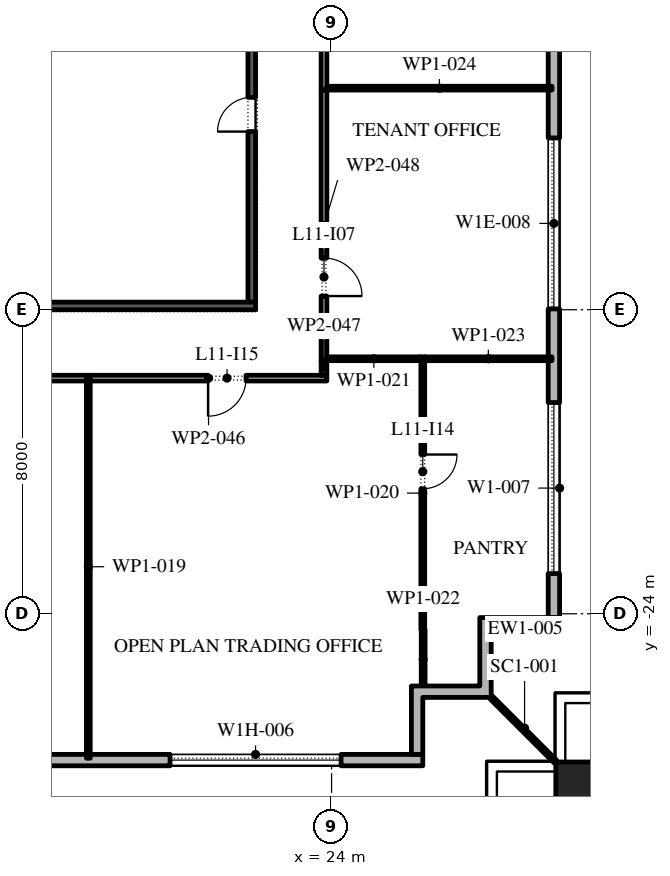
"""IFC4 building model, lengths in metres.
Left out: names, types, materials, properties, quantities, classifications, styles, units other than length and angle.
Written with IfcOpenShell. Run it as: python <this file> out.ifc"""

import sys

from ifc_helpers import new_model, si_unit, direction, frame, frame_2d, origin, origin_2d, place, context, subcontext, project, spatial, polyline, rectangle, outline, extrude, element, fill, save


model = new_model("IFC4")
c1 = context("Model", 3, precision=1e-05, world=origin(), true_north=direction((0.0, 1.0)))
c2 = subcontext(c1, "Body", "Model", "MODEL_VIEW")
j1 = project(units=[si_unit("LENGTHUNIT", "METRE"), si_unit("PLANEANGLEUNIT", "RADIAN")], contexts=[c1])
p1 = place(None, origin())
s1 = spatial("IfcSite", under=j1, at=p1, CompositionType="ELEMENT")
p2 = place(p1, origin())
s2 = spatial("IfcBuilding", under=s1, at=p2, CompositionType="ELEMENT")
p3 = place(p2, frame((0.0, 0.0, 56.4)))
s3 = spatial("IfcBuildingStorey", under=s2, at=p3, CompositionType="ELEMENT", Elevation=56.4)
p4 = place(p3, frame((30.6, -28.6, 0.0), z_axis=(0.0, 0.0, 1.0), x_axis=(1.0, 0.0, 0.0)))
e1 = element("IfcColumn", 1, at=p4, inside=s3, PredefinedType="COLUMN", context=c2, shape_type="SweptSolid", body=[
    extrude(rectangle(XDim=1.4, YDim=1.4, at=origin_2d()), origin(), (0.0, 0.0, 1.0), 4.2),
])
p5 = place(p3, frame((-26.1, -27.85, 0.0), z_axis=(0.0, 0.0, 1.0), x_axis=(1.0, 0.0, 0.0)))
e2 = element("IfcWall", 2, at=p5, inside=s3, PredefinedType="STANDARD", context=c2, shape_type="SweptSolid", body=[
    extrude(rectangle(XDim=52.5, YDim=0.3, at=frame_2d((26.25, 0.0))), origin(), (0.0, 0.0, 1.0), 4.0),
])
p6 = place(p5, frame((2.0, 0.0, 0.45)))
e3 = element("IfcOpeningElement", 3, at=p6, cuts=e2, PredefinedType="OPENING", context=c2, shape_type="SweptSolid", body=[
    extrude(rectangle(XDim=4.5, YDim=2.75, at=frame_2d((2.25, 1.375))), frame((0.0, 0.16, 0.0), z_axis=(0.0, -1.0, 0.0), x_axis=(1.0, 0.0, 0.0)), (0.0, 0.0, 1.0), 0.32),
])
p7 = place(p5, frame((10.65, 0.0, 0.45)))
e4 = element("IfcOpeningElement", 4, at=p7, cuts=e2, PredefinedType="OPENING", context=c2, shape_type="SweptSolid", body=[
    extrude(rectangle(XDim=4.5, YDim=2.75, at=frame_2d((2.25, 1.375))), frame((0.0, 0.16, 0.0), z_axis=(0.0, -1.0, 0.0), x_axis=(1.0, 0.0, 0.0)), (0.0, 0.0, 1.0), 0.32),
])
p8 = place(p5, frame((20.5, 0.0, 0.0)))
e5 = element("IfcOpeningElement", 5, at=p8, cuts=e2, PredefinedType="OPENING", context=c2, shape_type="SweptSolid", body=[
    extrude(rectangle(XDim=2.4, YDim=3.5, at=frame_2d((1.2, 1.75))), frame((0.0, 0.16, 0.0), z_axis=(0.0, -1.0, 0.0), x_axis=(1.0, 0.0, 0.0)), (0.0, 0.0, 1.0), 0.32),
])
p9 = place(p5, frame((28.25, 0.0, 0.45)))
e6 = element("IfcOpeningElement", 6, at=p9, cuts=e2, PredefinedType="OPENING", context=c2, shape_type="SweptSolid", body=[
    extrude(rectangle(XDim=4.5, YDim=2.75, at=frame_2d((2.25, 1.375))), frame((0.0, 0.16, 0.0), z_axis=(0.0, -1.0, 0.0), x_axis=(1.0, 0.0, 0.0)), (0.0, 0.0, 1.0), 0.32),
])
p10 = place(p5, frame((37.05, 0.0, 0.45)))
e7 = element("IfcOpeningElement", 7, at=p10, cuts=e2, PredefinedType="OPENING", context=c2, shape_type="SweptSolid", body=[
    extrude(rectangle(XDim=4.5, YDim=2.75, at=frame_2d((2.25, 1.375))), frame((0.0, 0.16, 0.0), z_axis=(0.0, -1.0, 0.0), x_axis=(1.0, 0.0, 0.0)), (0.0, 0.0, 1.0), 0.32),
])
p11 = place(p5, frame((45.85, 0.0, 0.45)))
e8 = element("IfcOpeningElement", 8, at=p11, cuts=e2, PredefinedType="OPENING", context=c2, shape_type="SweptSolid", body=[
    extrude(rectangle(XDim=4.5, YDim=2.75, at=frame_2d((2.25, 1.375))), frame((0.0, 0.16, 0.0), z_axis=(0.0, -1.0, 0.0), x_axis=(1.0, 0.0, 0.0)), (0.0, 0.0, 1.0), 0.32),
])
p12 = place(p3, frame((29.85, -24.1, 0.0), z_axis=(0.0, 0.0, 1.0), x_axis=(0.0, 1.0, 0.0)))
e9 = element("IfcWall", 9, at=p12, inside=s3, PredefinedType="STANDARD", context=c2, shape_type="SweptSolid", body=[
    extrude(rectangle(XDim=49.5, YDim=0.3, at=frame_2d((24.75, 0.0))), origin(), (0.0, 0.0, 1.0), 4.0),
])
p13 = place(p12, frame((1.157, 0.0, 0.45)))
e10 = element("IfcOpeningElement", 10, at=p13, cuts=e9, PredefinedType="OPENING", context=c2, shape_type="SweptSolid", body=[
    extrude(rectangle(XDim=4.5, YDim=3.05, at=frame_2d((2.25, 1.525))), frame((0.0, 0.16, 0.0), z_axis=(0.0, -1.0, 0.0), x_axis=(1.0, 0.0, 0.0)), (0.0, 0.0, 1.0), 0.32),
])
p14 = place(p12, frame((8.121, 0.0, 0.45)))
e11 = element("IfcOpeningElement", 11, at=p14, cuts=e9, PredefinedType="OPENING", context=c2, shape_type="SweptSolid", body=[
    extrude(rectangle(XDim=4.5, YDim=2.825, at=frame_2d((2.25, 1.413))), frame((0.0, 0.16, 0.0), z_axis=(0.0, -1.0, 0.0), x_axis=(1.0, 0.0, 0.0)), (0.0, 0.0, 1.0), 0.32),
])
p15 = place(p12, frame((16.286, 0.0, 0.0)))
e12 = element("IfcOpeningElement", 12, at=p15, cuts=e9, PredefinedType="OPENING", context=c2, shape_type="SweptSolid", body=[
    extrude(rectangle(XDim=2.4, YDim=3.325, at=frame_2d((1.2, 1.663))), frame((0.0, 0.16, 0.0), z_axis=(0.0, -1.0, 0.0), x_axis=(1.0, 0.0, 0.0)), (0.0, 0.0, 1.0), 0.32),
])
p16 = place(p12, frame((22.35, 0.0, 0.45)))
e13 = element("IfcOpeningElement", 13, at=p16, cuts=e9, PredefinedType="OPENING", context=c2, shape_type="SweptSolid", body=[
    extrude(rectangle(XDim=4.5, YDim=2.875, at=frame_2d((2.25, 1.438))), frame((0.0, 0.16, 0.0), z_axis=(0.0, -1.0, 0.0), x_axis=(1.0, 0.0, 0.0)), (0.0, 0.0, 1.0), 0.32),
])
p17 = place(p12, frame((29.464, 0.0, 0.45)))
e14 = element("IfcOpeningElement", 14, at=p17, cuts=e9, PredefinedType="OPENING", context=c2, shape_type="SweptSolid", body=[
    extrude(rectangle(XDim=4.5, YDim=2.875, at=frame_2d((2.25, 1.438))), frame((0.0, 0.16, 0.0), z_axis=(0.0, -1.0, 0.0), x_axis=(1.0, 0.0, 0.0)), (0.0, 0.0, 1.0), 0.32),
])
p18 = place(p12, frame((36.579, 0.0, 0.45)))
e15 = element("IfcOpeningElement", 15, at=p18, cuts=e9, PredefinedType="OPENING", context=c2, shape_type="SweptSolid", body=[
    extrude(rectangle(XDim=4.5, YDim=3.05, at=frame_2d((2.25, 1.525))), frame((0.0, 0.16, 0.0), z_axis=(0.0, -1.0, 0.0), x_axis=(1.0, 0.0, 0.0)), (0.0, 0.0, 1.0), 0.32),
])
p19 = place(p12, frame((44.743, 0.0, 0.0)))
e16 = element("IfcOpeningElement", 16, at=p19, cuts=e9, PredefinedType="OPENING", context=c2, shape_type="SweptSolid", body=[
    extrude(rectangle(XDim=2.4, YDim=3.325, at=frame_2d((1.2, 1.663))), frame((0.0, 0.16, 0.0), z_axis=(0.0, -1.0, 0.0), x_axis=(1.0, 0.0, 0.0)), (0.0, 0.0, 1.0), 0.32),
])
p20 = place(p3, origin())
e17 = element("IfcWall", 17, at=p20, inside=s3, PredefinedType="STANDARD", context=c2, shape_type="SweptSolid", body=[
    extrude(outline(polyline([(27.9, -25.9), (27.9, -24.1), (30.0, -24.1), (30.0, -24.4), (28.2, -24.4), (28.2, -26.2), (26.4, -26.2), (26.4, -27.7), (26.1, -27.7), (26.1, -25.9), (27.9, -25.9)])), origin(), (0.0, 0.0, 1.0), 4.0),
])
p21 = place(p3, frame((28.2, -26.2, -0.05), z_axis=(0.0, 0.0, 1.0), x_axis=(0.707106781187, -0.707106781187, 0.0)))
e18 = element("IfcWall", 18, at=p21, inside=s3, PredefinedType="STANDARD", context=c2, shape_type="SweptSolid", body=[
    extrude(rectangle(XDim=2.385, YDim=0.1, at=frame_2d((1.192, 0.0))), origin(), (0.0, 0.0, 1.0), 4.05),
])
p22 = place(p3, frame((21.9, -15.8, 0.0), z_axis=(0.0, 0.0, 1.0), x_axis=(0.0, 1.0, 0.0)))
e19 = element("IfcWall", 19, at=p22, inside=s3, PredefinedType="SHEAR", context=c2, shape_type="SweptSolid", body=[
    extrude(rectangle(XDim=13.05, YDim=0.2, at=frame_2d((6.525, 0.0))), origin(), (0.0, 0.0, 1.0), 4.0),
])
p23 = place(p22, frame((4.488, 0.0, 0.0)))
e20 = element("IfcOpeningElement", 20, at=p23, cuts=e19, PredefinedType="OPENING", context=c2, shape_type="SweptSolid", body=[
    extrude(rectangle(XDim=0.9, YDim=2.1, at=frame_2d((0.45, 1.05))), frame((0.0, 0.11, 0.0), z_axis=(0.0, -1.0, 0.0), x_axis=(1.0, 0.0, 0.0)), (0.0, 0.0, 1.0), 0.22),
])
p24 = place(p22, frame((11.038, 0.0, 0.0)))
e21 = element("IfcOpeningElement", 21, at=p24, cuts=e19, PredefinedType="OPENING", context=c2, shape_type="SweptSolid", body=[
    extrude(rectangle(XDim=1.0, YDim=2.1, at=frame_2d((0.5, 1.05))), frame((0.0, 0.11, 0.0), z_axis=(0.0, -1.0, 0.0), x_axis=(1.0, 0.0, 0.0)), (0.0, 0.0, 1.0), 0.22),
])
p25 = place(p3, frame((10.0, -15.9, 0.0), z_axis=(0.0, 0.0, 1.0), x_axis=(1.0, 0.0, 0.0)))
e22 = element("IfcWall", 22, at=p25, inside=s3, PredefinedType="SHEAR", context=c2, shape_type="SweptSolid", body=[
    extrude(rectangle(XDim=12.0, YDim=0.2, at=frame_2d((6.0, 0.0))), origin(), (0.0, 0.0, 1.0), 4.0),
])
p26 = place(p3, frame((17.6, -27.8, 0.0), z_axis=(0.0, 0.0, 1.0), x_axis=(0.0, 1.0, 0.0)))
e23 = element("IfcWall", 23, at=p26, inside=s3, PredefinedType="PARTITIONING", context=c2, shape_type="SweptSolid", body=[
    extrude(rectangle(XDim=10.075, YDim=0.1, at=frame_2d((5.038, 0.0))), origin(), (0.0, 0.0, 1.0), 4.0),
])
p27 = place(p3, frame((17.55, -17.8, 0.0), z_axis=(0.0, 0.0, 1.0), x_axis=(-1.0, 0.0, 0.0)))
e24 = element("IfcWall", 24, at=p27, inside=s3, PredefinedType="PARTITIONING", context=c2, shape_type="SweptSolid", body=[
    extrude(rectangle(XDim=8.7, YDim=0.15, at=frame_2d((4.35, 0.0))), origin(), (0.0, 0.0, 1.0), 4.0),
])
p28 = place(p27, frame((4.85, 0.0, 0.0)))
e25 = element("IfcOpeningElement", 25, at=p28, cuts=e24, PredefinedType="OPENING", context=c2, shape_type="SweptSolid", body=[
    extrude(rectangle(XDim=1.0, YDim=2.1, at=frame_2d((0.5, 1.05))), frame((0.0, 0.085, 0.0), z_axis=(0.0, -1.0, 0.0), x_axis=(1.0, 0.0, 0.0)), (0.0, 0.0, 1.0), 0.17),
])
p29 = place(p3, frame((23.875, -17.8, 0.0), z_axis=(0.0, 0.0, 1.0), x_axis=(-1.0, 0.0, 0.0)))
e26 = element("IfcWall", 26, at=p29, inside=s3, PredefinedType="PARTITIONING", context=c2, shape_type="SweptSolid", body=[
    extrude(rectangle(XDim=6.225, YDim=0.15, at=frame_2d((3.113, 0.0))), origin(), (0.0, 0.0, 1.0), 4.0),
])
p30 = place(p29, frame((2.125, 0.0, 0.0)))
e27 = element("IfcOpeningElement", 27, at=p30, cuts=e26, PredefinedType="OPENING", context=c2, shape_type="SweptSolid", body=[
    extrude(rectangle(XDim=1.0, YDim=2.1, at=frame_2d((0.5, 1.05))), frame((0.0, 0.085, 0.0), z_axis=(0.0, -1.0, 0.0), x_axis=(1.0, 0.0, 0.0)), (0.0, 0.0, 1.0), 0.17),
])
p31 = place(p3, frame((23.8, -17.34, 0.0), z_axis=(0.0, 0.0, 1.0), x_axis=(0.0, -1.0, 0.0)))
e28 = element("IfcWall", 28, at=p31, inside=s3, PredefinedType="PARTITIONING", context=c2, shape_type="SweptSolid", body=[
    extrude(rectangle(XDim=0.385, YDim=0.15, at=frame_2d((0.192, 0.0))), origin(), (0.0, 0.0, 1.0), 4.0),
])
p32 = place(p3, frame((23.8, -10.22, 0.0), z_axis=(0.0, 0.0, 1.0), x_axis=(0.0, -1.0, 0.0)))
e29 = element("IfcWall", 29, at=p32, inside=s3, PredefinedType="PARTITIONING", context=c2, shape_type="SweptSolid", body=[
    extrude(rectangle(XDim=7.12, YDim=0.15, at=frame_2d((3.56, 0.0))), origin(), (0.0, 0.0, 1.0), 4.0),
])
p33 = place(p32, frame((4.42, 0.0, 0.0)))
e30 = element("IfcOpeningElement", 30, at=p33, cuts=e29, PredefinedType="OPENING", context=c2, shape_type="SweptSolid", body=[
    extrude(rectangle(XDim=1.0, YDim=2.1, at=frame_2d((0.5, 1.05))), frame((0.0, 0.085, 0.0), z_axis=(0.0, -1.0, 0.0), x_axis=(1.0, 0.0, 0.0)), (0.0, 0.0, 1.0), 0.17),
])
p34 = place(p3, frame((23.8, 4.11, 0.0), z_axis=(0.0, 0.0, 1.0), x_axis=(0.0, -1.0, 0.0)))
e31 = element("IfcWall", 31, at=p34, inside=s3, PredefinedType="PARTITIONING", context=c2, shape_type="SweptSolid", body=[
    extrude(rectangle(XDim=14.33, YDim=0.15, at=frame_2d((7.165, 0.0))), origin(), (0.0, 0.0, 1.0), 4.0),
])
p35 = place(p34, frame((6.63, 0.0, 0.0)))
e32 = element("IfcOpeningElement", 32, at=p35, cuts=e31, PredefinedType="OPENING", context=c2, shape_type="SweptSolid", body=[
    extrude(rectangle(XDim=1.0, YDim=2.1, at=frame_2d((0.5, 1.05))), frame((0.0, 0.085, 0.0), z_axis=(0.0, -1.0, 0.0), x_axis=(1.0, 0.0, 0.0)), (0.0, 0.0, 1.0), 0.17),
])
p36 = place(p3, frame((26.4, -24.41, 0.0), z_axis=(0.0, 0.0, 1.0), x_axis=(0.0, 1.0, 0.0)))
e33 = element("IfcWall", 33, at=p36, inside=s3, PredefinedType="PARTITIONING", context=c2, shape_type="SweptSolid", body=[
    extrude(rectangle(XDim=7.17, YDim=0.1, at=frame_2d((3.585, 0.0))), origin(), (0.0, 0.0, 1.0), 4.0),
])
p37 = place(p36, frame((3.7, 0.0, 0.0)))
e34 = element("IfcOpeningElement", 34, at=p37, cuts=e33, PredefinedType="OPENING", context=c2, shape_type="SweptSolid", body=[
    extrude(rectangle(XDim=0.9, YDim=2.1, at=frame_2d((0.45, 1.05))), frame((0.0, 0.06, 0.0), z_axis=(0.0, -1.0, 0.0), x_axis=(1.0, 0.0, 0.0)), (0.0, 0.0, 1.0), 0.12),
])
p38 = place(p3, frame((26.35, -17.29, 0.0), z_axis=(0.0, 0.0, 1.0), x_axis=(-1.0, 0.0, 0.0)))
e35 = element("IfcWall", 35, at=p38, inside=s3, PredefinedType="PARTITIONING", context=c2, shape_type="SweptSolid", body=[
    extrude(rectangle(XDim=2.475, YDim=0.1, at=frame_2d((1.238, 0.0))), origin(), (0.0, 0.0, 1.0), 4.0),
])
p39 = place(p3, frame((26.41, -26.0, 0.0), z_axis=(0.0, 0.0, 1.0), x_axis=(0.0, 1.0, 0.0)))
e36 = element("IfcWall", 36, at=p39, inside=s3, PredefinedType="PARTITIONING", context=c2, shape_type="SweptSolid", body=[
    extrude(rectangle(XDim=1.59, YDim=0.1, at=frame_2d((0.795, 0.0))), origin(), (0.0, 0.0, 1.0), 4.0),
])
p40 = place(p3, frame((29.8, -17.29, 0.0), z_axis=(0.0, 0.0, 1.0), x_axis=(-1.0, 0.0, 0.0)))
e37 = element("IfcWall", 37, at=p40, inside=s3, PredefinedType="PARTITIONING", context=c2, shape_type="SweptSolid", body=[
    extrude(rectangle(XDim=3.35, YDim=0.1, at=frame_2d((1.675, 0.0))), origin(), (0.0, 0.0, 1.0), 4.0),
])
p41 = place(p3, frame((29.8, -10.17, 0.0), z_axis=(0.0, 0.0, 1.0), x_axis=(-1.0, 0.0, 0.0)))
e38 = element("IfcWall", 38, at=p41, inside=s3, PredefinedType="PARTITIONING", context=c2, shape_type="SweptSolid", body=[
    extrude(rectangle(XDim=5.925, YDim=0.1, at=frame_2d((2.962, 0.0))), origin(), (0.0, 0.0, 1.0), 4.0),
])
p42 = place(p11, origin())
e39 = element("IfcWindow", 39, at=p42, inside=s3, PartitioningType="DOUBLE_PANEL_VERTICAL", PredefinedType="WINDOW", context=c2, shape_type="SweptSolid", body=[
    extrude(rectangle(XDim=4.5, YDim=2.75, at=frame_2d((2.25, 1.375))), frame((0.0, 0.03, 0.0), z_axis=(0.0, -1.0, 0.0), x_axis=(1.0, 0.0, 0.0)), (0.0, 0.0, 1.0), 0.06),
])
fill(e8, e39)
p43 = place(p13, origin())
e40 = element("IfcWindow", 40, at=p43, inside=s3, PartitioningType="DOUBLE_PANEL_VERTICAL", PredefinedType="WINDOW", context=c2, shape_type="SweptSolid", body=[
    extrude(rectangle(XDim=4.5, YDim=3.05, at=frame_2d((2.25, 1.525))), frame((0.0, 0.03, 0.0), z_axis=(0.0, -1.0, 0.0), x_axis=(1.0, 0.0, 0.0)), (0.0, 0.0, 1.0), 0.06),
])
fill(e10, e40)
p44 = place(p14, origin())
e41 = element("IfcWindow", 41, at=p44, inside=s3, PartitioningType="DOUBLE_PANEL_VERTICAL", PredefinedType="WINDOW", context=c2, shape_type="SweptSolid", body=[
    extrude(rectangle(XDim=4.5, YDim=2.825, at=frame_2d((2.25, 1.413))), frame((0.0, 0.03, 0.0), z_axis=(0.0, -1.0, 0.0), x_axis=(1.0, 0.0, 0.0)), (0.0, 0.0, 1.0), 0.06),
])
fill(e11, e41)
p45 = place(p23, origin())
e42 = element("IfcDoor", 42, at=p45, inside=s3, OperationType="SINGLE_SWING_RIGHT", PredefinedType="DOOR", context=c2, shape_type="SweptSolid", body=[
    extrude(rectangle(XDim=0.9, YDim=2.1, at=frame_2d((0.45, 1.05))), frame((0.0, 0.1, 0.0), z_axis=(0.0, -1.0, 0.0), x_axis=(1.0, 0.0, 0.0)), (0.0, 0.0, 1.0), 0.05),
])
fill(e20, e42)
p46 = place(p33, origin())
e43 = element("IfcDoor", 43, at=p46, inside=s3, OperationType="SINGLE_SWING_LEFT", PredefinedType="DOOR", context=c2, shape_type="SweptSolid", body=[
    extrude(rectangle(XDim=1.0, YDim=2.1, at=frame_2d((0.5, 1.05))), frame((0.0, 0.025, 0.0), z_axis=(0.0, -1.0, 0.0), x_axis=(1.0, 0.0, 0.0)), (0.0, 0.0, 1.0), 0.05),
])
fill(e30, e43)
p47 = place(p37, frame((0.9, 0.0, 0.0), z_axis=(0.0, 0.0, 1.0), x_axis=(-1.0, 0.0, 0.0)))
e44 = element("IfcDoor", 44, at=p47, inside=s3, OperationType="SINGLE_SWING_RIGHT", PredefinedType="DOOR", context=c2, shape_type="SweptSolid", body=[
    extrude(rectangle(XDim=0.9, YDim=2.1, at=frame_2d((0.45, 1.05))), frame((0.0, 0.025, 0.0), z_axis=(0.0, -1.0, 0.0), x_axis=(1.0, 0.0, 0.0)), (0.0, 0.0, 1.0), 0.05),
])
fill(e34, e44)
p48 = place(p30, origin())
e45 = element("IfcDoor", 45, at=p48, inside=s3, OperationType="SINGLE_SWING_LEFT", PredefinedType="DOOR", context=c2, shape_type="SweptSolid", body=[
    extrude(rectangle(XDim=1.0, YDim=2.1, at=frame_2d((0.5, 1.05))), frame((0.0, 0.025, 0.0), z_axis=(0.0, -1.0, 0.0), x_axis=(1.0, 0.0, 0.0)), (0.0, 0.0, 1.0), 0.05),
])
fill(e27, e45)
save(model, sys.argv[1])
